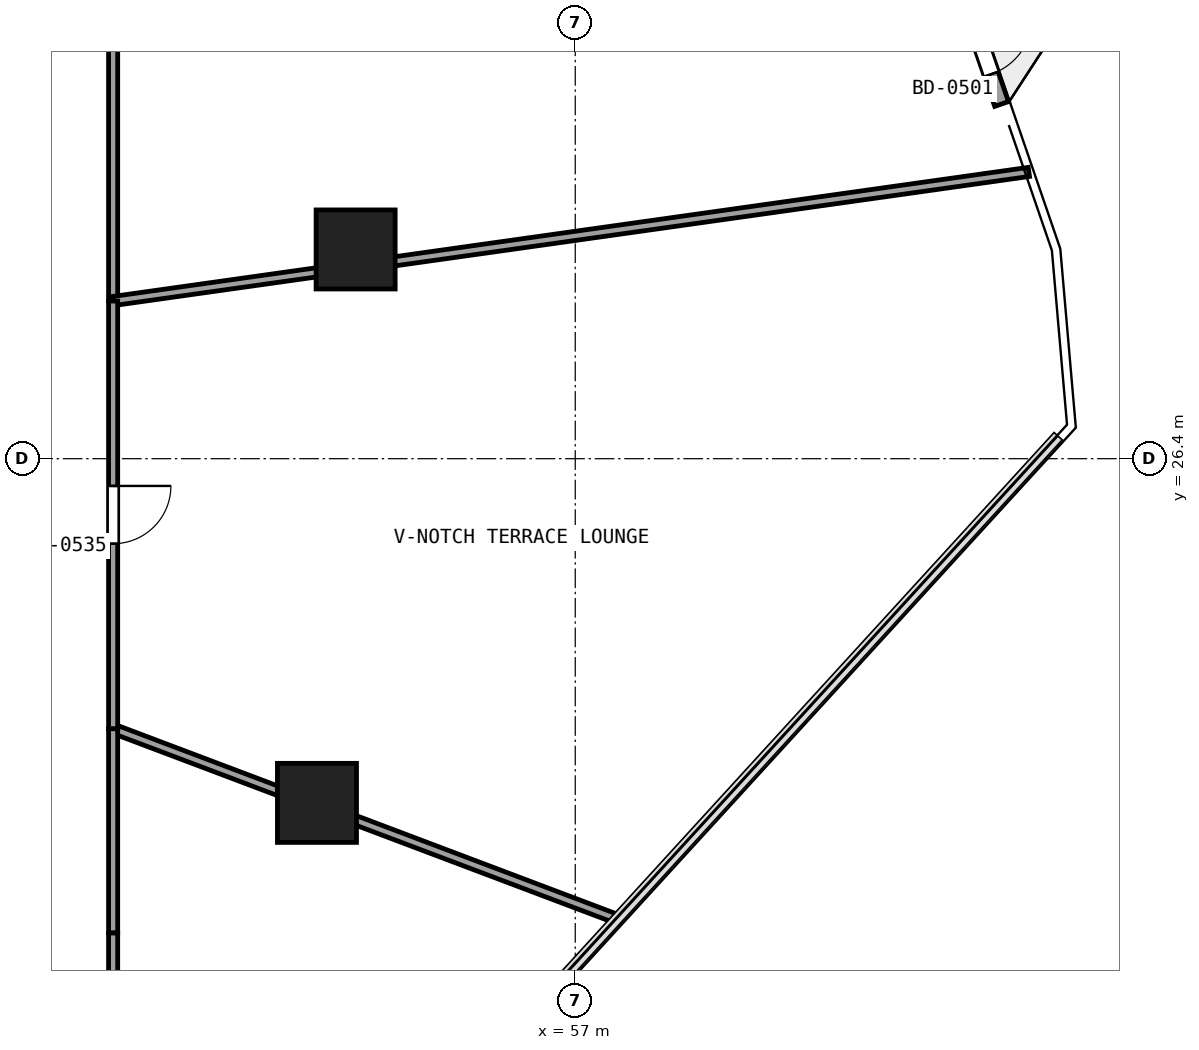
"""IFC4 building model, lengths in metres.
Left out: names, types, materials, properties, quantities, classifications, styles, units other than length and angle.
Written with IfcOpenShell. Run it as: python <this file> out.ifc"""

import sys

from ifc_helpers import new_model, si_unit, direction, frame, frame_2d, origin, origin_2d, place, context, subcontext, project, spatial, rectangle, extrude, element, fill, save


model = new_model("IFC4")
c1 = context("Model", 3, precision=1e-05, world=origin(), true_north=direction((0.0, 1.0)))
c2 = subcontext(c1, "Body", "Model", "MODEL_VIEW")
j1 = project(units=[si_unit("LENGTHUNIT", "METRE"), si_unit("PLANEANGLEUNIT", "RADIAN")], contexts=[c1])
p1 = place(None, origin())
s1 = spatial("IfcSite", under=j1, at=p1, CompositionType="ELEMENT")
p2 = place(p1, origin())
s2 = spatial("IfcBuilding", under=s1, at=p2, CompositionType="ELEMENT")
p3 = place(p2, frame((0.0, 0.0, 27.0)))
s3 = spatial("IfcBuildingStorey", under=s2, at=p3, CompositionType="ELEMENT", Elevation=27.0)
for number, where, z_axis, x_axis in (
    (1, (53.388, 29.841, -0.405), (0.0, 0.0, 1.0), (1.0, 0.0, 0.0)),
    (2, (52.752, 20.74, -0.405), (0.0, 0.0, 1.0), (1.0, 0.0, 0.0)),
):
    element("IfcColumn", number, at=place(p3, frame(where, z_axis=z_axis, x_axis=x_axis)), inside=s3, PredefinedType="COLUMN", context=c2, shape_type="SweptSolid", body=[
        extrude(rectangle(XDim=1.3, YDim=1.3, at=origin_2d()), origin(), (0.0, 0.0, 1.0), 3.575),
    ])
p4 = place(p3, frame((62.517, 36.583, 0.0), z_axis=(0.0, 0.0, 1.0), x_axis=(0.3249877985, -0.945718208996, 0.0)))
e3 = element("IfcWall", 3, at=p4, inside=s3, PredefinedType="SOLIDWALL", context=c2, shape_type="SweptSolid", body=[
    extrude(rectangle(XDim=4.6, YDim=0.24, at=frame_2d((2.3, 0.0))), origin(), (0.0, 0.0, 1.0), 3.17),
])
p5 = place(p4, frame((3.08, 0.0, 0.0)))
e4 = element("IfcOpeningElement", 4, at=p5, cuts=e3, PredefinedType="OPENING", context=c2, shape_type="SweptSolid", body=[
    extrude(rectangle(XDim=1.0, YDim=2.15, at=frame_2d((0.5, 1.075))), frame((0.0, 0.13, 0.0), z_axis=(0.0, -1.0, 0.0), x_axis=(1.0, 0.0, 0.0)), (0.0, 0.0, 1.0), 0.26),
])
p6 = place(p3, frame((49.4, 34.2, 0.0), z_axis=(0.0, 0.0, 1.0), x_axis=(0.0, -1.0, 0.0)))
e5 = element("IfcWall", 5, at=p6, inside=s3, PredefinedType="PARTITIONING", context=c2, shape_type="SweptSolid", body=[
    extrude(rectangle(XDim=5.207, YDim=0.15, at=frame_2d((2.604, 0.0))), origin(), (0.0, 0.0, 1.0), 2.395),
])
p7 = place(p3, frame((49.4, 28.993, 0.0), z_axis=(0.0, 0.0, 1.0), x_axis=(0.990209136723, 0.139591781813, 0.0)))
e6 = element("IfcWall", 6, at=p7, inside=s3, PredefinedType="PARTITIONING", context=c2, shape_type="SweptSolid", body=[
    extrude(rectangle(XDim=15.209, YDim=0.15, at=frame_2d((7.604, 0.0))), origin(), (0.0, 0.0, 1.0), 2.395),
])
p8 = place(p3, frame((57.732, 18.814, 0.0), z_axis=(0.0, 0.0, 1.0), x_axis=(-0.935533704254, 0.353237438848, 0.0)))
e7 = element("IfcWall", 7, at=p8, inside=s3, PredefinedType="PARTITIONING", context=c2, shape_type="SweptSolid", body=[
    extrude(rectangle(XDim=8.906, YDim=0.15, at=frame_2d((4.453, 0.0))), origin(), (0.0, 0.0, 1.0), 2.395),
])
p9 = place(p3, frame((49.4, 21.96, 0.0), z_axis=(0.0, 0.0, 1.0), x_axis=(0.0, -1.0, 0.0)))
e8 = element("IfcWall", 8, at=p9, inside=s3, PredefinedType="PARTITIONING", context=c2, shape_type="SweptSolid", body=[
    extrude(rectangle(XDim=3.36, YDim=0.15, at=frame_2d((1.68, 0.0))), origin(), (0.0, 0.0, 1.0), 2.395),
])
p10 = place(p3, frame((49.4, 18.6, 0.0), z_axis=(0.0, 0.0, 1.0), x_axis=(0.0, -1.0, 0.0)))
e9 = element("IfcWall", 9, at=p10, inside=s3, PredefinedType="PARTITIONING", context=c2, shape_type="SweptSolid", body=[
    extrude(rectangle(XDim=1.8, YDim=0.15, at=frame_2d((0.9, 0.0))), origin(), (0.0, 0.0, 1.0), 2.355),
])
p11 = place(p3, frame((49.4, 28.993, 0.0), z_axis=(0.0, 0.0, 1.0), x_axis=(0.0, -1.0, 0.0)))
e10 = element("IfcWall", 10, at=p11, inside=s3, PredefinedType="PARTITIONING", context=c2, shape_type="SweptSolid", body=[
    extrude(rectangle(XDim=7.033, YDim=0.15, at=frame_2d((3.517, 0.0))), origin(), (0.0, 0.0, 1.0), 2.395),
])
p12 = place(p11, frame((3.041, 0.0, 0.0)))
e11 = element("IfcOpeningElement", 11, at=p12, cuts=e10, PredefinedType="OPENING", context=c2, shape_type="SweptSolid", body=[
    extrude(rectangle(XDim=0.95, YDim=2.15, at=frame_2d((0.475, 1.075))), frame((0.0, 0.085, 0.0), z_axis=(0.0, -1.0, 0.0), x_axis=(1.0, 0.0, 0.0)), (0.0, 0.0, 1.0), 0.17),
])
p13 = place(p5, origin())
e12 = element("IfcDoor", 12, at=p13, inside=s3, OperationType="SINGLE_SWING_LEFT", PredefinedType="DOOR", context=c2, shape_type="SweptSolid", body=[
    extrude(rectangle(XDim=1.0, YDim=2.15, at=frame_2d((0.5, 1.075))), frame((0.0, 0.025, 0.0), z_axis=(0.0, -1.0, 0.0), x_axis=(1.0, 0.0, 0.0)), (0.0, 0.0, 1.0), 0.05),
])
fill(e4, e12)
p14 = place(p12, origin())
e13 = element("IfcDoor", 13, at=p14, inside=s3, OperationType="SINGLE_SWING_LEFT", PredefinedType="DOOR", context=c2, shape_type="SweptSolid", body=[
    extrude(rectangle(XDim=0.95, YDim=2.15, at=frame_2d((0.475, 1.075))), frame((0.0, 0.025, 0.0), z_axis=(0.0, -1.0, 0.0), x_axis=(1.0, 0.0, 0.0)), (0.0, 0.0, 1.0), 0.05),
])
fill(e11, e13)
save(model, sys.argv[1])
